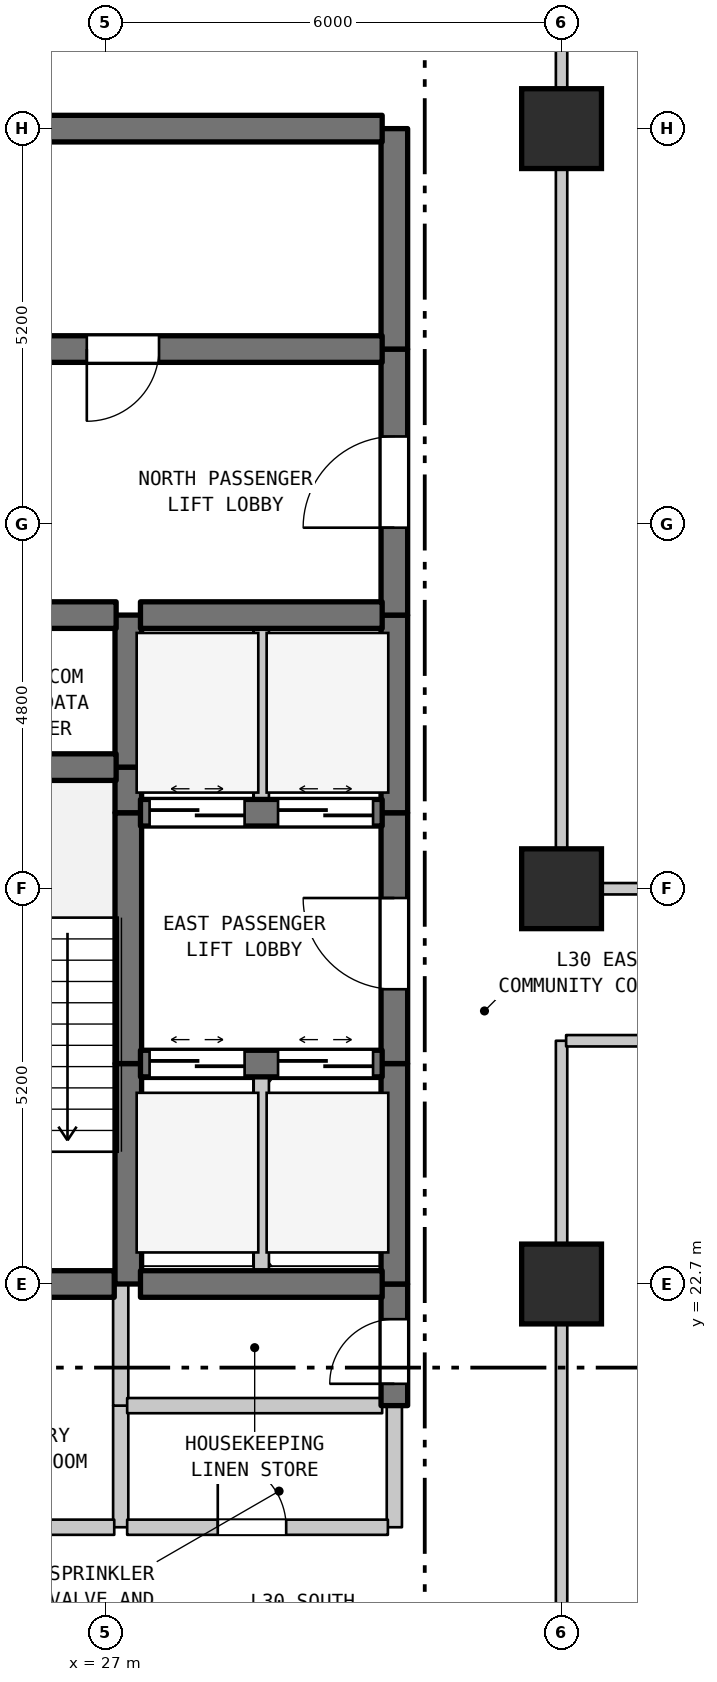
"""IFC4 building model, lengths in metres.
Left out: names, types, materials, properties, quantities, classifications, styles, units other than length and angle.
Written with IfcOpenShell. Run it as: python <this file> out.ifc"""

import sys

from ifc_helpers import new_model, si_unit, direction, frame, frame_2d, origin, origin_2d, place, context, subcontext, project, spatial, rectangle, extrude, element, fill, save


model = new_model("IFC4")
c1 = context("Model", 3, precision=1e-05, world=origin(), true_north=direction((0.0, 1.0)))
c2 = subcontext(c1, "Body", "Model", "MODEL_VIEW")
j1 = project(units=[si_unit("LENGTHUNIT", "METRE"), si_unit("PLANEANGLEUNIT", "RADIAN")], contexts=[c1])
p1 = place(None, origin())
s1 = spatial("IfcSite", under=j1, at=p1, CompositionType="ELEMENT")
p2 = place(p1, origin())
s2 = spatial("IfcBuilding", under=s1, at=p2, CompositionType="ELEMENT")
p3 = place(p2, frame((0.0, 0.0, 125.3)))
s3 = spatial("IfcBuildingStorey", under=s2, at=p3, CompositionType="ELEMENT", Elevation=125.3)
for number, where, z_axis, x_axis in (
    (1, (33.0, 22.7, 0.0), (0.0, 0.0, 1.0), (1.0, 0.0, 0.0)),
    (2, (33.0, 27.9, 0.0), (0.0, 0.0, 1.0), (1.0, 0.0, 0.0)),
    (3, (33.0, 37.9, 0.0), (0.0, 0.0, 1.0), (1.0, 0.0, 0.0)),
):
    element("IfcColumn", number, at=place(p3, frame(where, z_axis=z_axis, x_axis=x_axis)), inside=s3, PredefinedType="COLUMN", context=c2, shape_type="SweptSolid", body=[
        extrude(rectangle(XDim=1.05, YDim=1.05, at=origin_2d()), origin(), (0.0, 0.0, 1.0), 4.5),
    ])
p4 = place(p3, frame((27.2, 19.5, 0.0), z_axis=(0.0, 0.0, 1.0), x_axis=(0.0, 1.0, 0.0)))
e4 = element("IfcWall", 4, at=p4, inside=s3, PredefinedType="STANDARD", context=c2, shape_type="SweptSolid", body=[
    extrude(rectangle(XDim=1.6, YDim=0.2, at=frame_2d((0.8, 0.0))), origin(), (0.0, 0.0, 1.0), 4.185),
])
p5 = place(p3, frame((27.2, 21.1, 0.0), z_axis=(0.0, 0.0, 1.0), x_axis=(0.0, 1.0, 0.0)))
e5 = element("IfcWall", 5, at=p5, inside=s3, PredefinedType="STANDARD", context=c2, shape_type="SweptSolid", body=[
    extrude(rectangle(XDim=1.6, YDim=0.2, at=frame_2d((0.8, 0.0))), origin(), (0.0, 0.0, 1.0), 4.185),
])
p6 = place(p3, frame((27.3, 22.7, 0.0), z_axis=(0.0, 0.0, 1.0), x_axis=(0.0, 1.0, 0.0)))
e6 = element("IfcWall", 6, at=p6, inside=s3, PredefinedType="SHEAR", context=c2, shape_type="SweptSolid", body=[
    extrude(rectangle(XDim=2.9, YDim=0.35, at=frame_2d((1.45, 0.0))), origin(), (0.0, 0.0, 1.0), 4.185),
])
p7 = place(p3, frame((27.3, 25.6, 0.0), z_axis=(0.0, 0.0, 1.0), x_axis=(0.0, 1.0, 0.0)))
e7 = element("IfcWall", 7, at=p7, inside=s3, PredefinedType="SHEAR", context=c2, shape_type="SweptSolid", body=[
    extrude(rectangle(XDim=3.3, YDim=0.35, at=frame_2d((1.65, 0.0))), origin(), (0.0, 0.0, 1.0), 4.185),
])
p8 = place(p3, frame((27.3, 28.9, 0.0), z_axis=(0.0, 0.0, 1.0), x_axis=(0.0, 1.0, 0.0)))
e8 = element("IfcWall", 8, at=p8, inside=s3, PredefinedType="SHEAR", context=c2, shape_type="SweptSolid", body=[
    extrude(rectangle(XDim=0.6, YDim=0.35, at=frame_2d((0.3, 0.0))), origin(), (0.0, 0.0, 1.0), 4.185),
])
p9 = place(p3, frame((27.3, 29.5, 0.0), z_axis=(0.0, 0.0, 1.0), x_axis=(0.0, 1.0, 0.0)))
e9 = element("IfcWall", 9, at=p9, inside=s3, PredefinedType="SHEAR", context=c2, shape_type="SweptSolid", body=[
    extrude(rectangle(XDim=2.0, YDim=0.35, at=frame_2d((1.0, 0.0))), origin(), (0.0, 0.0, 1.0), 4.185),
])
p10 = place(p3, frame((29.05, 22.7, 0.0), z_axis=(0.0, 0.0, 1.0), x_axis=(0.0, 1.0, 0.0)))
e10 = element("IfcWall", 10, at=p10, inside=s3, PredefinedType="STANDARD", context=c2, shape_type="SweptSolid", body=[
    extrude(rectangle(XDim=2.9, YDim=0.2, at=frame_2d((1.45, 0.0))), origin(), (0.0, 0.0, 1.0), 4.185),
])
p11 = place(p3, frame((29.05, 28.9, 0.0), z_axis=(0.0, 0.0, 1.0), x_axis=(0.0, 1.0, 0.0)))
e11 = element("IfcWall", 11, at=p11, inside=s3, PredefinedType="STANDARD", context=c2, shape_type="SweptSolid", body=[
    extrude(rectangle(XDim=2.6, YDim=0.2, at=frame_2d((1.3, 0.0))), origin(), (0.0, 0.0, 1.0), 4.185),
])
p12 = place(p3, frame((30.8, 19.5, 0.0), z_axis=(0.0, 0.0, 1.0), x_axis=(0.0, 1.0, 0.0)))
e12 = element("IfcWall", 12, at=p12, inside=s3, PredefinedType="STANDARD", context=c2, shape_type="SweptSolid", body=[
    extrude(rectangle(XDim=1.6, YDim=0.2, at=frame_2d((0.8, 0.0))), origin(), (0.0, 0.0, 1.0), 4.185),
])
p13 = place(p3, frame((30.8, 21.1, 0.0), z_axis=(0.0, 0.0, 1.0), x_axis=(0.0, 1.0, 0.0)))
e13 = element("IfcWall", 13, at=p13, inside=s3, PredefinedType="SHEAR", context=c2, shape_type="SweptSolid", body=[
    extrude(rectangle(XDim=1.6, YDim=0.35, at=frame_2d((0.8, 0.0))), origin(), (0.0, 0.0, 1.0), 4.185),
])
p14 = place(p13, frame((0.287, 0.0, 0.0)))
e14 = element("IfcOpeningElement", 14, at=p14, cuts=e13, PredefinedType="OPENING", context=c2, shape_type="SweptSolid", body=[
    extrude(rectangle(XDim=0.85, YDim=2.1, at=frame_2d((0.425, 1.05))), frame((0.0, 0.185, 0.0), z_axis=(0.0, -1.0, 0.0), x_axis=(1.0, 0.0, 0.0)), (0.0, 0.0, 1.0), 0.37),
])
p15 = place(p3, frame((30.8, 22.7, 0.0), z_axis=(0.0, 0.0, 1.0), x_axis=(0.0, 1.0, 0.0)))
e15 = element("IfcWall", 15, at=p15, inside=s3, PredefinedType="SHEAR", context=c2, shape_type="SweptSolid", body=[
    extrude(rectangle(XDim=2.9, YDim=0.35, at=frame_2d((1.45, 0.0))), origin(), (0.0, 0.0, 1.0), 4.185),
])
p16 = place(p3, frame((30.8, 25.6, 0.0), z_axis=(0.0, 0.0, 1.0), x_axis=(0.0, 1.0, 0.0)))
e16 = element("IfcWall", 16, at=p16, inside=s3, PredefinedType="SHEAR", context=c2, shape_type="SweptSolid", body=[
    extrude(rectangle(XDim=3.3, YDim=0.35, at=frame_2d((1.65, 0.0))), origin(), (0.0, 0.0, 1.0), 4.185),
])
p17 = place(p16, frame((0.978, 0.0, 0.0)))
e17 = element("IfcOpeningElement", 17, at=p17, cuts=e16, PredefinedType="OPENING", context=c2, shape_type="SweptSolid", body=[
    extrude(rectangle(XDim=1.2, YDim=2.2, at=frame_2d((0.6, 1.1))), frame((0.0, 0.185, 0.0), z_axis=(0.0, -1.0, 0.0), x_axis=(1.0, 0.0, 0.0)), (0.0, 0.0, 1.0), 0.37),
])
p18 = place(p3, frame((30.8, 28.9, 0.0), z_axis=(0.0, 0.0, 1.0), x_axis=(0.0, 1.0, 0.0)))
e18 = element("IfcWall", 18, at=p18, inside=s3, PredefinedType="SHEAR", context=c2, shape_type="SweptSolid", body=[
    extrude(rectangle(XDim=2.6, YDim=0.35, at=frame_2d((1.3, 0.0))), origin(), (0.0, 0.0, 1.0), 4.185),
])
p19 = place(p3, frame((30.8, 31.5, 0.0), z_axis=(0.0, 0.0, 1.0), x_axis=(0.0, 1.0, 0.0)))
e19 = element("IfcWall", 19, at=p19, inside=s3, PredefinedType="SHEAR", context=c2, shape_type="SweptSolid", body=[
    extrude(rectangle(XDim=3.5, YDim=0.35, at=frame_2d((1.75, 0.0))), origin(), (0.0, 0.0, 1.0), 4.185),
])
p20 = place(p19, frame((1.15, 0.0, 0.0)))
e20 = element("IfcOpeningElement", 20, at=p20, cuts=e19, PredefinedType="OPENING", context=c2, shape_type="SweptSolid", body=[
    extrude(rectangle(XDim=1.2, YDim=2.2, at=frame_2d((0.6, 1.1))), frame((0.0, 0.185, 0.0), z_axis=(0.0, -1.0, 0.0), x_axis=(1.0, 0.0, 0.0)), (0.0, 0.0, 1.0), 0.37),
])
p21 = place(p3, frame((30.8, 35.0, 0.0), z_axis=(0.0, 0.0, 1.0), x_axis=(0.0, 1.0, 0.0)))
e21 = element("IfcWall", 21, at=p21, inside=s3, PredefinedType="SHEAR", context=c2, shape_type="SweptSolid", body=[
    extrude(rectangle(XDim=2.9, YDim=0.35, at=frame_2d((1.45, 0.0))), origin(), (0.0, 0.0, 1.0), 4.185),
])
p22 = place(p3, frame((33.0, 6.7, 0.0), z_axis=(0.0, 0.0, 1.0), x_axis=(0.0, 1.0, 0.0)))
e22 = element("IfcWall", 22, at=p22, inside=s3, PredefinedType="STANDARD", context=c2, shape_type="SweptSolid", body=[
    extrude(rectangle(XDim=19.2, YDim=0.15, at=frame_2d((9.6, 0.0))), origin(), (0.0, 0.0, 1.0), 3.735),
])
p23 = place(p3, frame((33.0, 27.9, 0.0), z_axis=(0.0, 0.0, 1.0), x_axis=(0.0, 1.0, 0.0)))
e23 = element("IfcWall", 23, at=p23, inside=s3, PredefinedType="STANDARD", context=c2, shape_type="SweptSolid", body=[
    extrude(rectangle(XDim=10.0, YDim=0.15, at=frame_2d((5.0, 0.0))), origin(), (0.0, 0.0, 1.0), 3.685),
])
p24 = place(p3, frame((23.96, 19.5, 0.0), z_axis=(0.0, 0.0, 1.0), x_axis=(1.0, 0.0, 0.0)))
e24 = element("IfcWall", 24, at=p24, inside=s3, PredefinedType="STANDARD", context=c2, shape_type="SweptSolid", body=[
    extrude(rectangle(XDim=3.155, YDim=0.2, at=frame_2d((1.578, 0.0))), origin(), (0.0, 0.0, 1.0), 4.185),
])
p25 = place(p24, frame((0.991, 0.0, 0.0)))
e25 = element("IfcOpeningElement", 25, at=p25, cuts=e24, PredefinedType="OPENING", context=c2, shape_type="SweptSolid", body=[
    extrude(rectangle(XDim=0.95, YDim=2.15, at=frame_2d((0.475, 1.075))), frame((0.0, 0.11, 0.0), z_axis=(0.0, -1.0, 0.0), x_axis=(1.0, 0.0, 0.0)), (0.0, 0.0, 1.0), 0.22),
])
p26 = place(p3, frame((27.285, 19.5, 0.0), z_axis=(0.0, 0.0, 1.0), x_axis=(1.0, 0.0, 0.0)))
e26 = element("IfcWall", 26, at=p26, inside=s3, PredefinedType="STANDARD", context=c2, shape_type="SweptSolid", body=[
    extrude(rectangle(XDim=3.43, YDim=0.2, at=frame_2d((1.715, 0.0))), origin(), (0.0, 0.0, 1.0), 4.185),
])
p27 = place(p26, frame((1.192, 0.0, 0.0)))
e27 = element("IfcOpeningElement", 27, at=p27, cuts=e26, PredefinedType="OPENING", context=c2, shape_type="SweptSolid", body=[
    extrude(rectangle(XDim=0.9, YDim=2.15, at=frame_2d((0.45, 1.075))), frame((0.0, 0.11, 0.0), z_axis=(0.0, -1.0, 0.0), x_axis=(1.0, 0.0, 0.0)), (0.0, 0.0, 1.0), 0.22),
])
p28 = place(p3, frame((27.285, 21.1, 0.0), z_axis=(0.0, 0.0, 1.0), x_axis=(1.0, 0.0, 0.0)))
e28 = element("IfcWall", 28, at=p28, inside=s3, PredefinedType="STANDARD", context=c2, shape_type="SweptSolid", body=[
    extrude(rectangle(XDim=3.355, YDim=0.2, at=frame_2d((1.677, 0.0))), origin(), (0.0, 0.0, 1.0), 4.185),
])
p29 = place(p3, frame((23.96, 22.7, 0.0), z_axis=(0.0, 0.0, 1.0), x_axis=(1.0, 0.0, 0.0)))
e29 = element("IfcWall", 29, at=p29, inside=s3, PredefinedType="SHEAR", context=c2, shape_type="SweptSolid", body=[
    extrude(rectangle(XDim=3.155, YDim=0.35, at=frame_2d((1.578, 0.0))), origin(), (0.0, 0.0, 1.0), 4.185),
])
p30 = place(p3, frame((27.46, 22.7, 0.0), z_axis=(0.0, 0.0, 1.0), x_axis=(1.0, 0.0, 0.0)))
e30 = element("IfcWall", 30, at=p30, inside=s3, PredefinedType="SHEAR", context=c2, shape_type="SweptSolid", body=[
    extrude(rectangle(XDim=3.18, YDim=0.35, at=frame_2d((1.59, 0.0))), origin(), (0.0, 0.0, 1.0), 4.185),
])
p31 = place(p3, frame((27.46, 25.6, 0.0), z_axis=(0.0, 0.0, 1.0), x_axis=(1.0, 0.0, 0.0)))
e31 = element("IfcWall", 31, at=p31, inside=s3, PredefinedType="SHEAR", context=c2, shape_type="SweptSolid", body=[
    extrude(rectangle(XDim=3.18, YDim=0.35, at=frame_2d((1.59, 0.0))), origin(), (0.0, 0.0, 1.0), 4.185),
])
p32 = place(p31, frame((0.12, 0.0, 0.0)))
e32 = element("IfcOpeningElement", 32, at=p32, cuts=e31, PredefinedType="OPENING", context=c2, shape_type="SweptSolid", body=[
    extrude(rectangle(XDim=1.25, YDim=2.2, at=frame_2d((0.625, 1.1))), frame((0.0, 0.185, 0.0), z_axis=(0.0, -1.0, 0.0), x_axis=(1.0, 0.0, 0.0)), (0.0, 0.0, 1.0), 0.37),
])
p33 = place(p31, frame((1.81, 0.0, 0.0)))
e33 = element("IfcOpeningElement", 33, at=p33, cuts=e31, PredefinedType="OPENING", context=c2, shape_type="SweptSolid", body=[
    extrude(rectangle(XDim=1.25, YDim=2.2, at=frame_2d((0.625, 1.1))), frame((0.0, 0.185, 0.0), z_axis=(0.0, -1.0, 0.0), x_axis=(1.0, 0.0, 0.0)), (0.0, 0.0, 1.0), 0.37),
])
p34 = place(p3, frame((33.06, 25.9, 0.0), z_axis=(0.0, 0.0, 1.0), x_axis=(1.0, 0.0, 0.0)))
e34 = element("IfcWall", 34, at=p34, inside=s3, PredefinedType="STANDARD", context=c2, shape_type="SweptSolid", body=[
    extrude(rectangle(XDim=17.895, YDim=0.15, at=frame_2d((8.948, 0.0))), origin(), (0.0, 0.0, 1.0), 4.185),
])
p35 = place(p34, frame((8.369, 0.0, 0.0)))
e35 = element("IfcOpeningElement", 35, at=p35, cuts=e34, PredefinedType="OPENING", context=c2, shape_type="SweptSolid", body=[
    extrude(rectangle(XDim=1.0, YDim=2.15, at=frame_2d((0.5, 1.075))), frame((0.0, 0.085, 0.0), z_axis=(0.0, -1.0, 0.0), x_axis=(1.0, 0.0, 0.0)), (0.0, 0.0, 1.0), 0.17),
])
p36 = place(p3, frame((33.06, 27.9, 0.0), z_axis=(0.0, 0.0, 1.0), x_axis=(1.0, 0.0, 0.0)))
e36 = element("IfcWall", 36, at=p36, inside=s3, PredefinedType="STANDARD", context=c2, shape_type="SweptSolid", body=[
    extrude(rectangle(XDim=11.94, YDim=0.15, at=frame_2d((5.97, 0.0))), origin(), (0.0, 0.0, 1.0), 3.685),
])
p37 = place(p36, frame((8.77, 0.0, 0.0)))
e37 = element("IfcOpeningElement", 37, at=p37, cuts=e36, PredefinedType="OPENING", context=c2, shape_type="SweptSolid", body=[
    extrude(rectangle(XDim=1.2, YDim=2.2, at=frame_2d((0.6, 1.1))), frame((0.0, 0.085, 0.0), z_axis=(0.0, -1.0, 0.0), x_axis=(1.0, 0.0, 0.0)), (0.0, 0.0, 1.0), 0.17),
])
p38 = place(p3, frame((27.46, 28.9, 0.0), z_axis=(0.0, 0.0, 1.0), x_axis=(1.0, 0.0, 0.0)))
e38 = element("IfcWall", 38, at=p38, inside=s3, PredefinedType="SHEAR", context=c2, shape_type="SweptSolid", body=[
    extrude(rectangle(XDim=3.18, YDim=0.35, at=frame_2d((1.59, 0.0))), origin(), (0.0, 0.0, 1.0), 4.185),
])
p39 = place(p38, frame((0.12, 0.0, 0.0)))
e39 = element("IfcOpeningElement", 39, at=p39, cuts=e38, PredefinedType="OPENING", context=c2, shape_type="SweptSolid", body=[
    extrude(rectangle(XDim=1.25, YDim=2.2, at=frame_2d((0.625, 1.1))), frame((0.0, 0.185, 0.0), z_axis=(0.0, -1.0, 0.0), x_axis=(1.0, 0.0, 0.0)), (0.0, 0.0, 1.0), 0.37),
])
p40 = place(p38, frame((1.81, 0.0, 0.0)))
e40 = element("IfcOpeningElement", 40, at=p40, cuts=e38, PredefinedType="OPENING", context=c2, shape_type="SweptSolid", body=[
    extrude(rectangle(XDim=1.25, YDim=2.2, at=frame_2d((0.625, 1.1))), frame((0.0, 0.185, 0.0), z_axis=(0.0, -1.0, 0.0), x_axis=(1.0, 0.0, 0.0)), (0.0, 0.0, 1.0), 0.37),
])
p41 = place(p3, frame((23.96, 29.5, 0.0), z_axis=(0.0, 0.0, 1.0), x_axis=(1.0, 0.0, 0.0)))
e41 = element("IfcWall", 41, at=p41, inside=s3, PredefinedType="SHEAR", context=c2, shape_type="SweptSolid", body=[
    extrude(rectangle(XDim=3.18, YDim=0.35, at=frame_2d((1.59, 0.0))), origin(), (0.0, 0.0, 1.0), 4.185),
])
p42 = place(p3, frame((23.96, 31.5, 0.0), z_axis=(0.0, 0.0, 1.0), x_axis=(1.0, 0.0, 0.0)))
e42 = element("IfcWall", 42, at=p42, inside=s3, PredefinedType="SHEAR", context=c2, shape_type="SweptSolid", body=[
    extrude(rectangle(XDim=3.18, YDim=0.35, at=frame_2d((1.59, 0.0))), origin(), (0.0, 0.0, 1.0), 4.185),
])
p43 = place(p42, frame((1.094, 0.0, 0.0)))
e43 = element("IfcOpeningElement", 43, at=p43, cuts=e42, PredefinedType="OPENING", context=c2, shape_type="SweptSolid", body=[
    extrude(rectangle(XDim=0.85, YDim=2.1, at=frame_2d((0.425, 1.05))), frame((0.0, 0.185, 0.0), z_axis=(0.0, -1.0, 0.0), x_axis=(1.0, 0.0, 0.0)), (0.0, 0.0, 1.0), 0.37),
])
p44 = place(p3, frame((27.46, 31.5, 0.0), z_axis=(0.0, 0.0, 1.0), x_axis=(1.0, 0.0, 0.0)))
e44 = element("IfcWall", 44, at=p44, inside=s3, PredefinedType="SHEAR", context=c2, shape_type="SweptSolid", body=[
    extrude(rectangle(XDim=3.18, YDim=0.35, at=frame_2d((1.59, 0.0))), origin(), (0.0, 0.0, 1.0), 4.185),
])
p45 = place(p3, frame((23.96, 35.0, 0.0), z_axis=(0.0, 0.0, 1.0), x_axis=(1.0, 0.0, 0.0)))
e45 = element("IfcWall", 45, at=p45, inside=s3, PredefinedType="SHEAR", context=c2, shape_type="SweptSolid", body=[
    extrude(rectangle(XDim=6.68, YDim=0.35, at=frame_2d((3.34, 0.0))), origin(), (0.0, 0.0, 1.0), 4.185),
])
p46 = place(p45, frame((2.794, 0.0, 0.0)))
e46 = element("IfcOpeningElement", 46, at=p46, cuts=e45, PredefinedType="OPENING", context=c2, shape_type="SweptSolid", body=[
    extrude(rectangle(XDim=0.95, YDim=2.15, at=frame_2d((0.475, 1.075))), frame((0.0, 0.185, 0.0), z_axis=(0.0, -1.0, 0.0), x_axis=(1.0, 0.0, 0.0)), (0.0, 0.0, 1.0), 0.37),
])
p47 = place(p3, frame((23.96, 37.9, 0.0), z_axis=(0.0, 0.0, 1.0), x_axis=(1.0, 0.0, 0.0)))
e47 = element("IfcWall", 47, at=p47, inside=s3, PredefinedType="SHEAR", context=c2, shape_type="SweptSolid", body=[
    extrude(rectangle(XDim=6.68, YDim=0.35, at=frame_2d((3.34, 0.0))), origin(), (0.0, 0.0, 1.0), 4.185),
])
p48 = place(p3, frame((33.0, 37.9, 0.0), z_axis=(0.0, 0.0, 1.0), x_axis=(0.0, 1.0, 0.0)))
e48 = element("IfcWall", 48, at=p48, inside=s3, PredefinedType="STANDARD", context=c2, shape_type="SweptSolid", body=[
    extrude(rectangle(XDim=2.4, YDim=0.15, at=frame_2d((1.2, 0.0))), origin(), (0.0, 0.0, 1.0), 3.585),
])
p49 = place(p14, origin())
e49 = element("IfcDoor", 49, at=p49, inside=s3, OperationType="SINGLE_SWING_LEFT", PredefinedType="DOOR", context=c2, shape_type="SweptSolid", body=[
    extrude(rectangle(XDim=0.85, YDim=2.1, at=frame_2d((0.425, 1.05))), frame((0.0, 0.025, 0.0), z_axis=(0.0, -1.0, 0.0), x_axis=(1.0, 0.0, 0.0)), (0.0, 0.0, 1.0), 0.05),
])
fill(e14, e49)
p50 = place(p17, origin())
e50 = element("IfcDoor", 50, at=p50, inside=s3, OperationType="SINGLE_SWING_RIGHT", PredefinedType="DOOR", context=c2, shape_type="SweptSolid", body=[
    extrude(rectangle(XDim=1.2, YDim=2.2, at=frame_2d((0.6, 1.1))), frame((0.0, 0.025, 0.0), z_axis=(0.0, -1.0, 0.0), x_axis=(1.0, 0.0, 0.0)), (0.0, 0.0, 1.0), 0.05),
])
fill(e17, e50)
p51 = place(p20, origin())
e51 = element("IfcDoor", 51, at=p51, inside=s3, OperationType="SINGLE_SWING_LEFT", PredefinedType="DOOR", context=c2, shape_type="SweptSolid", body=[
    extrude(rectangle(XDim=1.2, YDim=2.2, at=frame_2d((0.6, 1.1))), frame((0.0, 0.025, 0.0), z_axis=(0.0, -1.0, 0.0), x_axis=(1.0, 0.0, 0.0)), (0.0, 0.0, 1.0), 0.05),
])
fill(e20, e51)
p52 = place(p27, origin())
e52 = element("IfcDoor", 52, at=p52, inside=s3, OperationType="SINGLE_SWING_LEFT", PredefinedType="DOOR", context=c2, shape_type="SweptSolid", body=[
    extrude(rectangle(XDim=0.9, YDim=2.15, at=frame_2d((0.45, 1.075))), frame((0.0, 0.025, 0.0), z_axis=(0.0, -1.0, 0.0), x_axis=(1.0, 0.0, 0.0)), (0.0, 0.0, 1.0), 0.05),
])
fill(e27, e52)
p53 = place(p32, origin())
e53 = element("IfcDoor", 53, at=p53, inside=s3, OperationType="DOUBLE_DOOR_SLIDING", PredefinedType="DOOR", context=c2, shape_type="SweptSolid", body=[
    extrude(rectangle(XDim=1.25, YDim=2.2, at=frame_2d((0.625, 1.1))), frame((0.0, 0.025, 0.0), z_axis=(0.0, -1.0, 0.0), x_axis=(1.0, 0.0, 0.0)), (0.0, 0.0, 1.0), 0.05),
])
fill(e32, e53)
p54 = place(p33, origin())
e54 = element("IfcDoor", 54, at=p54, inside=s3, OperationType="DOUBLE_DOOR_SLIDING", PredefinedType="DOOR", context=c2, shape_type="SweptSolid", body=[
    extrude(rectangle(XDim=1.25, YDim=2.2, at=frame_2d((0.625, 1.1))), frame((0.0, 0.025, 0.0), z_axis=(0.0, -1.0, 0.0), x_axis=(1.0, 0.0, 0.0)), (0.0, 0.0, 1.0), 0.05),
])
fill(e33, e54)
p55 = place(p39, origin())
e55 = element("IfcDoor", 55, at=p55, inside=s3, OperationType="DOUBLE_DOOR_SLIDING", PredefinedType="DOOR", context=c2, shape_type="SweptSolid", body=[
    extrude(rectangle(XDim=1.25, YDim=2.2, at=frame_2d((0.625, 1.1))), frame((0.0, 0.025, 0.0), z_axis=(0.0, -1.0, 0.0), x_axis=(1.0, 0.0, 0.0)), (0.0, 0.0, 1.0), 0.05),
])
fill(e39, e55)
p56 = place(p40, origin())
e56 = element("IfcDoor", 56, at=p56, inside=s3, OperationType="DOUBLE_DOOR_SLIDING", PredefinedType="DOOR", context=c2, shape_type="SweptSolid", body=[
    extrude(rectangle(XDim=1.25, YDim=2.2, at=frame_2d((0.625, 1.1))), frame((0.0, 0.025, 0.0), z_axis=(0.0, -1.0, 0.0), x_axis=(1.0, 0.0, 0.0)), (0.0, 0.0, 1.0), 0.05),
])
fill(e40, e56)
p57 = place(p46, frame((0.95, 0.0, 0.0), z_axis=(0.0, 0.0, 1.0), x_axis=(-1.0, 0.0, 0.0)))
e57 = element("IfcDoor", 57, at=p57, inside=s3, OperationType="SINGLE_SWING_LEFT", PredefinedType="DOOR", context=c2, shape_type="SweptSolid", body=[
    extrude(rectangle(XDim=0.95, YDim=2.15, at=frame_2d((0.475, 1.075))), frame((0.0, 0.025, 0.0), z_axis=(0.0, -1.0, 0.0), x_axis=(1.0, 0.0, 0.0)), (0.0, 0.0, 1.0), 0.05),
])
fill(e46, e57)
save(model, sys.argv[1])
